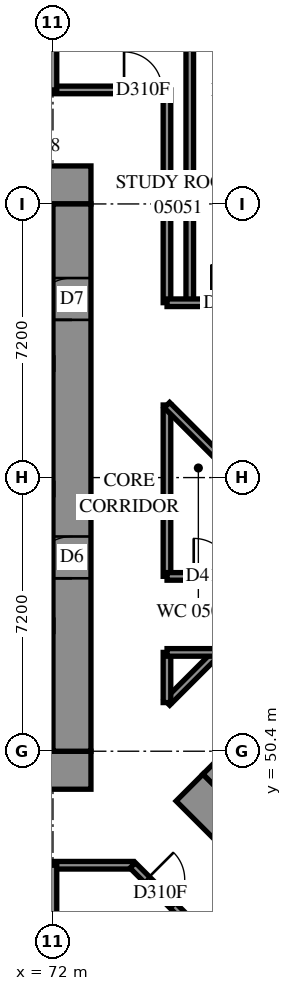
"""IFC4 building model, lengths in metres.
Left out: names, types, materials, properties, quantities, classifications, styles, units other than length and angle.
Written with IfcOpenShell. Run it as: python <this file> out.ifc"""

import sys

from ifc_helpers import new_model, si_unit, direction, frame, frame_2d, origin, place, context, subcontext, project, spatial, rectangle, extrude, element, fill, save


model = new_model("IFC4")
c1 = context("Model", 3, precision=1e-05, world=origin(), true_north=direction((0.0, 1.0)))
c2 = subcontext(c1, "Body", "Model", "MODEL_VIEW")
j1 = project(units=[si_unit("LENGTHUNIT", "METRE"), si_unit("PLANEANGLEUNIT", "RADIAN")], contexts=[c1])
p1 = place(None, origin())
s1 = spatial("IfcSite", under=j1, at=p1, CompositionType="ELEMENT")
p2 = place(p1, origin())
s2 = spatial("IfcBuilding", under=s1, at=p2, CompositionType="ELEMENT")
p3 = place(p2, frame((0.0, 0.0, 22.8)))
s3 = spatial("IfcBuildingStorey", under=s2, at=p3, CompositionType="ELEMENT", Elevation=22.8)
p4 = place(p3, frame((56.6, 49.9, -0.4), z_axis=(0.0, 0.0, 1.0), x_axis=(1.0, 0.0, 0.0)))
e1 = element("IfcWall", 1, at=p4, inside=s3, PredefinedType="SHEAR", context=c2, shape_type="SweptSolid", body=[
    extrude(rectangle(XDim=16.4, YDim=1.0, at=frame_2d((8.2, 0.0))), origin(), (0.0, 0.0, 1.0), 3.6),
])
p5 = place(p3, frame((56.6, 65.3, -0.4), z_axis=(0.0, 0.0, 1.0), x_axis=(1.0, 0.0, 0.0)))
e2 = element("IfcWall", 2, at=p5, inside=s3, PredefinedType="SHEAR", context=c2, shape_type="SweptSolid", body=[
    extrude(rectangle(XDim=16.4, YDim=1.0, at=frame_2d((8.2, 0.0))), origin(), (0.0, 0.0, 1.0), 3.6),
])
p6 = place(p5, frame((11.0, 0.0, 0.4)))
e3 = element("IfcOpeningElement", 3, at=p6, cuts=e2, PredefinedType="OPENING", context=c2, shape_type="SweptSolid", body=[
    extrude(rectangle(XDim=0.8, YDim=2.1, at=frame_2d((0.4, 1.05))), frame((0.0, 0.51, 0.0), z_axis=(0.0, -1.0, 0.0), x_axis=(1.0, 0.0, 0.0)), (0.0, 0.0, 1.0), 1.02),
])
p7 = place(p3, frame((72.5, 50.4, -0.4), z_axis=(0.0, 0.0, 1.0), x_axis=(0.0, 1.0, 0.0)))
e4 = element("IfcWall", 4, at=p7, inside=s3, PredefinedType="SHEAR", context=c2, shape_type="SweptSolid", body=[
    extrude(rectangle(XDim=14.4, YDim=1.0, at=frame_2d((7.2, 0.0))), origin(), (0.0, 0.0, 1.0), 3.6),
])
p8 = place(p7, frame((4.55, 0.0, 0.4)))
e5 = element("IfcOpeningElement", 5, at=p8, cuts=e4, PredefinedType="OPENING", context=c2, shape_type="SweptSolid", body=[
    extrude(rectangle(XDim=1.1, YDim=2.1, at=frame_2d((0.55, 1.05))), frame((0.0, 0.51, 0.0), z_axis=(0.0, -1.0, 0.0), x_axis=(1.0, 0.0, 0.0)), (0.0, 0.0, 1.0), 1.02),
])
p9 = place(p7, frame((11.35, 0.0, 0.4)))
e6 = element("IfcOpeningElement", 6, at=p9, cuts=e4, PredefinedType="OPENING", context=c2, shape_type="SweptSolid", body=[
    extrude(rectangle(XDim=1.1, YDim=2.1, at=frame_2d((0.55, 1.05))), frame((0.0, 0.51, 0.0), z_axis=(0.0, -1.0, 0.0), x_axis=(1.0, 0.0, 0.0)), (0.0, 0.0, 1.0), 1.02),
])
p10 = place(p3, frame((75.594, 49.443, -0.4), z_axis=(0.0, 0.0, 1.0), x_axis=(0.7071037324, -0.70710983, 0.0)))
e7 = element("IfcWall", 7, at=p10, inside=s3, PredefinedType="SHEAR", context=c2, shape_type="SweptSolid", body=[
    extrude(rectangle(XDim=16.4, YDim=1.0, at=frame_2d((8.2, 0.0))), origin(), (0.0, 0.0, 1.0), 3.6),
])
p11 = place(p3, frame((76.301, 49.443, -0.4), z_axis=(0.0, 0.0, 1.0), x_axis=(0.7071067812, 0.7071067812, 0.0)))
e8 = element("IfcWall", 8, at=p11, inside=s3, PredefinedType="SHEAR", context=c2, shape_type="SweptSolid", body=[
    extrude(rectangle(XDim=14.4, YDim=1.0, at=frame_2d((7.2, 0.0))), origin(), (0.0, 0.0, 1.0), 3.6),
])
p12 = place(p11, frame((4.55, 0.0, 0.4)))
e9 = element("IfcOpeningElement", 9, at=p12, cuts=e8, PredefinedType="OPENING", context=c2, shape_type="SweptSolid", body=[
    extrude(rectangle(XDim=1.1, YDim=2.1, at=frame_2d((0.55, 1.05))), frame((0.0, 0.51, 0.0), z_axis=(0.0, -1.0, 0.0), x_axis=(1.0, 0.0, 0.0)), (0.0, 0.0, 1.0), 1.02),
])
p13 = place(p11, frame((11.35, 0.0, 0.4)))
e10 = element("IfcOpeningElement", 10, at=p13, cuts=e8, PredefinedType="OPENING", context=c2, shape_type="SweptSolid", body=[
    extrude(rectangle(XDim=1.1, YDim=2.1, at=frame_2d((0.55, 1.05))), frame((0.0, 0.51, 0.0), z_axis=(0.0, -1.0, 0.0), x_axis=(1.0, 0.0, 0.0)), (0.0, 0.0, 1.0), 1.02),
])
p14 = place(p3, frame((54.6, 67.8, 0.0), z_axis=(0.0, 0.0, 1.0), x_axis=(1.0, 0.0, 0.0)))
e11 = element("IfcWall", 11, at=p14, inside=s3, PredefinedType="PARTITIONING", context=c2, shape_type="SweptSolid", body=[
    extrude(rectangle(XDim=20.4, YDim=0.2, at=frame_2d((10.2, 0.0))), origin(), (0.0, 0.0, 1.0), 3.9),
])
p15 = place(p14, frame((19.271, 0.0, 0.0)))
e12 = element("IfcOpeningElement", 12, at=p15, cuts=e11, PredefinedType="OPENING", context=c2, shape_type="SweptSolid", body=[
    extrude(rectangle(XDim=1.0, YDim=2.1, at=frame_2d((0.5, 1.05))), frame((0.0, 0.11, 0.0), z_axis=(0.0, -1.0, 0.0), x_axis=(1.0, 0.0, 0.0)), (0.0, 0.0, 1.0), 0.22),
])
p16 = place(p14, frame((6.862, 0.0, 0.0)))
e13 = element("IfcOpeningElement", 13, at=p16, cuts=e11, PredefinedType="OPENING", context=c2, shape_type="SweptSolid", body=[
    extrude(rectangle(XDim=1.0, YDim=2.1, at=frame_2d((0.5, 1.05))), frame((0.0, 0.11, 0.0), z_axis=(0.0, -1.0, 0.0), x_axis=(1.0, 0.0, 0.0)), (0.0, 0.0, 1.0), 0.22),
])
p17 = place(p14, frame((14.062, 0.0, 0.0)))
e14 = element("IfcOpeningElement", 14, at=p17, cuts=e11, PredefinedType="OPENING", context=c2, shape_type="SweptSolid", body=[
    extrude(rectangle(XDim=1.0, YDim=2.1, at=frame_2d((0.5, 1.05))), frame((0.0, 0.11, 0.0), z_axis=(0.0, -1.0, 0.0), x_axis=(1.0, 0.0, 0.0)), (0.0, 0.0, 1.0), 0.22),
])
p18 = place(p3, frame((54.6, 47.4, 0.0), z_axis=(0.0, 0.0, 1.0), x_axis=(1.0, 0.0, 0.0)))
e15 = element("IfcWall", 15, at=p18, inside=s3, PredefinedType="PARTITIONING", context=c2, shape_type="SweptSolid", body=[
    extrude(rectangle(XDim=19.502, YDim=0.2, at=frame_2d((9.751, 0.0))), origin(), (0.0, 0.0, 1.0), 3.9),
])
p19 = place(p18, frame((6.886, 0.0, 0.0)))
e16 = element("IfcOpeningElement", 16, at=p19, cuts=e15, PredefinedType="OPENING", context=c2, shape_type="SweptSolid", body=[
    extrude(rectangle(XDim=1.0, YDim=2.1, at=frame_2d((0.5, 1.05))), frame((0.0, 0.11, 0.0), z_axis=(0.0, -1.0, 0.0), x_axis=(1.0, 0.0, 0.0)), (0.0, 0.0, 1.0), 0.22),
])
p20 = place(p18, frame((14.086, 0.0, 0.0)))
e17 = element("IfcOpeningElement", 17, at=p20, cuts=e15, PredefinedType="OPENING", context=c2, shape_type="SweptSolid", body=[
    extrude(rectangle(XDim=1.0, YDim=2.1, at=frame_2d((0.5, 1.05))), frame((0.0, 0.11, 0.0), z_axis=(0.0, -1.0, 0.0), x_axis=(1.0, 0.0, 0.0)), (0.0, 0.0, 1.0), 0.22),
])
p21 = place(p3, frame((75.6, 62.2, 0.0), z_axis=(0.0, 0.0, 1.0), x_axis=(0.0, 1.0, 0.0)))
e18 = element("IfcWall", 18, at=p21, inside=s3, PredefinedType="PARTITIONING", context=c2, shape_type="SweptSolid", body=[
    extrude(rectangle(XDim=10.45, YDim=0.2, at=frame_2d((5.225, 0.0))), origin(), (0.0, 0.0, 1.0), 3.9),
])
p22 = place(p3, frame((75.0, 62.202, 0.0), z_axis=(0.0, 0.0, 1.0), x_axis=(0.0, 1.0, 0.0)))
e19 = element("IfcWall", 19, at=p22, inside=s3, PredefinedType="PARTITIONING", context=c2, shape_type="SweptSolid", body=[
    extrude(rectangle(XDim=5.598, YDim=0.2, at=frame_2d((2.799, 0.0))), origin(), (0.0, 0.0, 1.0), 3.9),
])
p23 = place(p3, frame((74.099, 47.397, 0.0), z_axis=(0.0, 0.0, 1.0), x_axis=(0.7071067812, -0.7071067812, 0.0)))
e20 = element("IfcWall", 20, at=p23, inside=s3, PredefinedType="PARTITIONING", context=c2, shape_type="SweptSolid", body=[
    extrude(rectangle(XDim=4.593, YDim=0.2, at=frame_2d((2.297, 0.0))), origin(), (0.0, 0.0, 1.0), 3.9),
])
p24 = place(p23, frame((0.521, 0.0, 0.0)))
e21 = element("IfcOpeningElement", 21, at=p24, cuts=e20, PredefinedType="OPENING", context=c2, shape_type="SweptSolid", body=[
    extrude(rectangle(XDim=1.0, YDim=2.1, at=frame_2d((0.5, 1.05))), frame((0.0, 0.11, 0.0), z_axis=(0.0, -1.0, 0.0), x_axis=(1.0, 0.0, 0.0)), (0.0, 0.0, 1.0), 0.22),
])
p25 = place(p3, frame((75.0, 55.002, 0.0), z_axis=(0.0, 0.0, 1.0), x_axis=(0.0, 1.0, 0.0)))
e22 = element("IfcWall", 22, at=p25, inside=s3, PredefinedType="PARTITIONING", context=c2, shape_type="SweptSolid", body=[
    extrude(rectangle(XDim=4.508, YDim=0.2, at=frame_2d((2.254, 0.0))), origin(), (0.0, 0.0, 1.0), 3.9),
])
p26 = place(p3, frame((75.002, 62.2, 0.0), z_axis=(0.0, 0.0, 1.0), x_axis=(1.0, 0.0, 0.0)))
e23 = element("IfcWall", 23, at=p26, inside=s3, PredefinedType="PARTITIONING", context=c2, shape_type="SweptSolid", body=[
    extrude(rectangle(XDim=4.198, YDim=0.2, at=frame_2d((2.099, 0.0))), origin(), (0.0, 0.0, 1.0), 3.9),
])
p27 = place(p26, frame((1.165, 0.0, 0.0)))
e24 = element("IfcOpeningElement", 24, at=p27, cuts=e23, PredefinedType="OPENING", context=c2, shape_type="SweptSolid", body=[
    extrude(rectangle(XDim=1.0, YDim=2.1, at=frame_2d((0.5, 1.05))), frame((0.0, 0.11, 0.0), z_axis=(0.0, -1.0, 0.0), x_axis=(1.0, 0.0, 0.0)), (0.0, 0.0, 1.0), 0.22),
])
for number, where, z_axis, x_axis in (
    (25, (72.0, 67.8, 0.0), (0.0, 0.0, 1.0), (0.0, 1.0, 0.0)),
    (26, (72.0, 43.8, 0.0), (0.0, 0.0, 1.0), (0.0, 1.0, 0.0)),
):
    element("IfcWall", number, at=place(p3, frame(where, z_axis=z_axis, x_axis=x_axis)), inside=s3, PredefinedType="PARTITIONING", context=c2, shape_type="SweptSolid", body=[
        extrude(rectangle(XDim=3.6, YDim=0.2, at=frame_2d((1.8, 0.0))), origin(), (0.0, 0.0, 1.0), 3.9),
    ])
p28 = place(p3, frame((74.999, 59.507, 0.0), z_axis=(0.0, 0.0, 1.0), x_axis=(0.7071067812, -0.7071067812, 0.0)))
e27 = element("IfcWall", 27, at=p28, inside=s3, PredefinedType="PARTITIONING", context=c2, shape_type="SweptSolid", body=[
    extrude(rectangle(XDim=3.321, YDim=0.2, at=frame_2d((1.66, 0.0))), origin(), (0.0, 0.0, 1.0), 3.9),
])
p29 = place(p3, frame((75.002, 55.0, 0.0), z_axis=(0.0, 0.0, 1.0), x_axis=(1.0, 0.0, 0.0)))
e28 = element("IfcWall", 28, at=p29, inside=s3, PredefinedType="PARTITIONING", context=c2, shape_type="SweptSolid", body=[
    extrude(rectangle(XDim=3.32, YDim=0.2, at=frame_2d((1.66, 0.0))), origin(), (0.0, 0.0, 1.0), 3.9),
])
p30 = place(p29, frame((0.702, 0.0, 0.0)))
e29 = element("IfcOpeningElement", 29, at=p30, cuts=e28, PredefinedType="OPENING", context=c2, shape_type="SweptSolid", body=[
    extrude(rectangle(XDim=1.0, YDim=2.1, at=frame_2d((0.5, 1.05))), frame((0.0, 0.11, 0.0), z_axis=(0.0, -1.0, 0.0), x_axis=(1.0, 0.0, 0.0)), (0.0, 0.0, 1.0), 0.22),
])
p31 = place(p3, frame((75.001, 51.681, 0.0), z_axis=(0.0, 0.0, 1.0), x_axis=(0.7071067812, 0.7071067812, 0.0)))
e30 = element("IfcWall", 30, at=p31, inside=s3, PredefinedType="PARTITIONING", context=c2, shape_type="SweptSolid", body=[
    extrude(rectangle(XDim=1.864, YDim=0.2, at=frame_2d((0.932, 0.0))), origin(), (0.0, 0.0, 1.0), 3.9),
])
p32 = place(p3, frame((75.0, 51.68, 0.0), z_axis=(0.0, 0.0, 1.0), x_axis=(0.0, 1.0, 0.0)))
e31 = element("IfcWall", 31, at=p32, inside=s3, PredefinedType="PARTITIONING", context=c2, shape_type="SweptSolid", body=[
    extrude(rectangle(XDim=1.32, YDim=0.2, at=frame_2d((0.66, 0.0))), origin(), (0.0, 0.0, 1.0), 3.9),
])
p33 = place(p3, frame((75.002, 53.0, 0.0), z_axis=(0.0, 0.0, 1.0), x_axis=(1.0, 0.0, 0.0)))
e32 = element("IfcWall", 32, at=p33, inside=s3, PredefinedType="PARTITIONING", context=c2, shape_type="SweptSolid", body=[
    extrude(rectangle(XDim=1.318, YDim=0.2, at=frame_2d((0.659, 0.0))), origin(), (0.0, 0.0, 1.0), 3.9),
])
p34 = place(p8, origin())
e33 = element("IfcDoor", 33, at=p34, inside=s3, OperationType="DOUBLE_DOOR_SINGLE_SWING", PredefinedType="DOOR", context=c2, shape_type="SweptSolid", body=[
    extrude(rectangle(XDim=1.1, YDim=2.1, at=frame_2d((0.55, 1.05))), frame((0.0, 0.025, 0.0), z_axis=(0.0, -1.0, 0.0), x_axis=(1.0, 0.0, 0.0)), (0.0, 0.0, 1.0), 0.05),
])
fill(e5, e33)
p35 = place(p9, origin())
e34 = element("IfcDoor", 34, at=p35, inside=s3, OperationType="SINGLE_SWING_RIGHT", PredefinedType="DOOR", context=c2, shape_type="SweptSolid", body=[
    extrude(rectangle(XDim=1.1, YDim=2.1, at=frame_2d((0.55, 1.05))), frame((0.0, 0.025, 0.0), z_axis=(0.0, -1.0, 0.0), x_axis=(1.0, 0.0, 0.0)), (0.0, 0.0, 1.0), 0.05),
])
fill(e6, e34)
p36 = place(p24, origin())
e35 = element("IfcDoor", 35, at=p36, inside=s3, OperationType="SINGLE_SWING_LEFT", PredefinedType="DOOR", context=c2, shape_type="SweptSolid", body=[
    extrude(rectangle(XDim=1.0, YDim=2.1, at=frame_2d((0.5, 1.05))), frame((0.0, 0.025, 0.0), z_axis=(0.0, -1.0, 0.0), x_axis=(1.0, 0.0, 0.0)), (0.0, 0.0, 1.0), 0.05),
])
fill(e21, e35)
p37 = place(p30, origin())
e36 = element("IfcDoor", 36, at=p37, inside=s3, OperationType="SINGLE_SWING_LEFT", PredefinedType="DOOR", context=c2, shape_type="SweptSolid", body=[
    extrude(rectangle(XDim=1.0, YDim=2.1, at=frame_2d((0.5, 1.05))), frame((0.0, 0.025, 0.0), z_axis=(0.0, -1.0, 0.0), x_axis=(1.0, 0.0, 0.0)), (0.0, 0.0, 1.0), 0.05),
])
fill(e29, e36)
p38 = place(p15, origin())
e37 = element("IfcDoor", 37, at=p38, inside=s3, OperationType="SINGLE_SWING_RIGHT", PredefinedType="DOOR", context=c2, shape_type="SweptSolid", body=[
    extrude(rectangle(XDim=1.0, YDim=2.1, at=frame_2d((0.5, 1.05))), frame((0.0, 0.025, 0.0), z_axis=(0.0, -1.0, 0.0), x_axis=(1.0, 0.0, 0.0)), (0.0, 0.0, 1.0), 0.05),
])
fill(e12, e37)
p39 = place(p27, origin())
e38 = element("IfcDoor", 38, at=p39, inside=s3, OperationType="SINGLE_SWING_LEFT", PredefinedType="DOOR", context=c2, shape_type="SweptSolid", body=[
    extrude(rectangle(XDim=1.0, YDim=2.1, at=frame_2d((0.5, 1.05))), frame((0.0, 0.025, 0.0), z_axis=(0.0, -1.0, 0.0), x_axis=(1.0, 0.0, 0.0)), (0.0, 0.0, 1.0), 0.05),
])
fill(e24, e38)
save(model, sys.argv[1])
